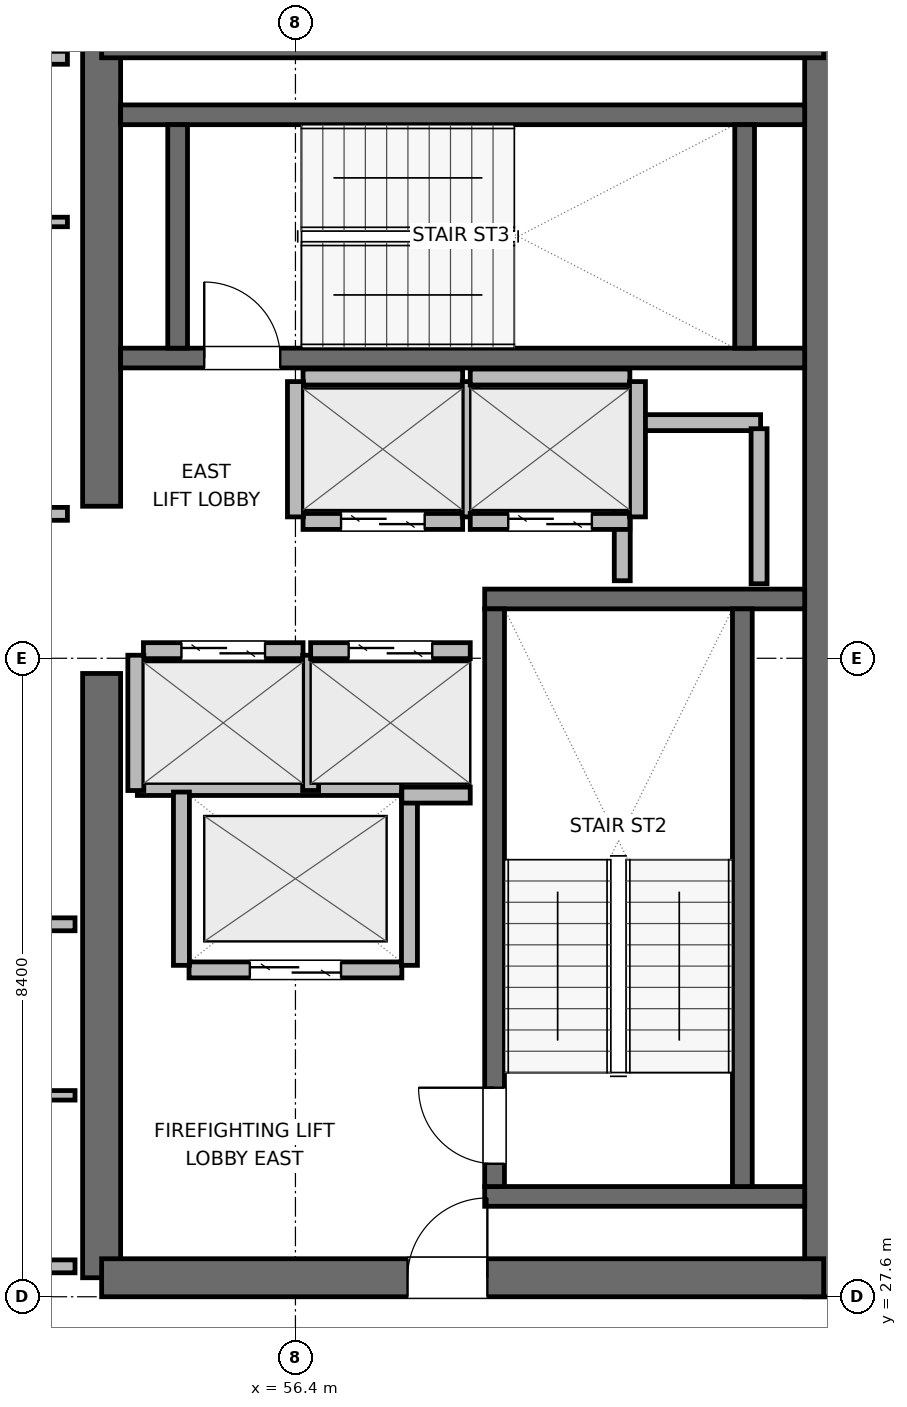
"""IFC4 building model, lengths in metres.
Left out: names, types, materials, properties, quantities, classifications, styles, units other than length and angle.
Written with IfcOpenShell. Run it as: python <this file> out.ifc"""

import sys

from ifc_helpers import new_model, si_unit, direction, frame, frame_2d, origin, place, context, subcontext, project, spatial, rectangle, extrude, element, fill, save


model = new_model("IFC4")
c1 = context("Model", 3, precision=1e-05, world=origin(), true_north=direction((0.0, 1.0)))
c2 = subcontext(c1, "Body", "Model", "MODEL_VIEW")
j1 = project(units=[si_unit("LENGTHUNIT", "METRE"), si_unit("PLANEANGLEUNIT", "RADIAN")], contexts=[c1])
p1 = place(None, origin())
s1 = spatial("IfcSite", under=j1, at=p1, CompositionType="ELEMENT")
p2 = place(p1, origin())
s2 = spatial("IfcBuilding", under=s1, at=p2, CompositionType="ELEMENT")
p3 = place(p2, frame((0.0, 0.0, 290.1)))
s3 = spatial("IfcBuildingStorey", under=s2, at=p3, CompositionType="ELEMENT", Elevation=290.1)
p4 = place(p3, frame((53.85, 27.85, 0.0), z_axis=(0.0, 0.0, 1.0), x_axis=(0.0, 1.0, 0.0)))
e1 = element("IfcWall", 1, at=p4, inside=s3, PredefinedType="SHEAR", context=c2, shape_type="SweptSolid", body=[
    extrude(rectangle(XDim=7.95, YDim=0.5, at=frame_2d((3.975, 0.0))), origin(), (0.0, 0.0, 1.0), 3.9),
])
p5 = place(p3, frame((53.85, 38.0, 0.0), z_axis=(0.0, 0.0, 1.0), x_axis=(0.0, 1.0, 0.0)))
e2 = element("IfcWall", 2, at=p5, inside=s3, PredefinedType="SHEAR", context=c2, shape_type="SweptSolid", body=[
    extrude(rectangle(XDim=6.15, YDim=0.5, at=frame_2d((3.075, 0.0))), origin(), (0.0, 0.0, 1.0), 3.9),
])
p6 = place(p3, frame((63.35, 27.6, 0.0), z_axis=(0.0, 0.0, 1.0), x_axis=(0.0, 1.0, 0.0)))
e3 = element("IfcWall", 3, at=p6, inside=s3, PredefinedType="SHEAR", context=c2, shape_type="SweptSolid", body=[
    extrude(rectangle(XDim=16.8, YDim=0.5, at=frame_2d((8.4, 0.0))), origin(), (0.0, 0.0, 1.0), 3.9),
])
p7 = place(p3, frame((53.85, 27.85, 0.0), z_axis=(0.0, 0.0, 1.0), x_axis=(1.0, 0.0, 0.0)))
e4 = element("IfcWall", 4, at=p7, inside=s3, PredefinedType="SHEAR", context=c2, shape_type="SweptSolid", body=[
    extrude(rectangle(XDim=9.5, YDim=0.5, at=frame_2d((4.75, 0.0))), origin(), (0.0, 0.0, 1.0), 3.9),
])
p8 = place(p7, frame((4.025, 0.0, 0.0)))
e5 = element("IfcOpeningElement", 5, at=p8, cuts=e4, PredefinedType="OPENING", context=c2, shape_type="SweptSolid", body=[
    extrude(rectangle(XDim=1.05, YDim=2.04, at=frame_2d((0.525, 1.02))), frame((0.0, 0.26, 0.0), z_axis=(0.0, -1.0, 0.0), x_axis=(1.0, 0.0, 0.0)), (0.0, 0.0, 1.0), 0.52),
])
p9 = place(p3, frame((53.85, 44.15, 0.0), z_axis=(0.0, 0.0, 1.0), x_axis=(1.0, 0.0, 0.0)))
e6 = element("IfcWall", 6, at=p9, inside=s3, PredefinedType="SHEAR", context=c2, shape_type="SweptSolid", body=[
    extrude(rectangle(XDim=9.5, YDim=0.5, at=frame_2d((4.75, 0.0))), origin(), (0.0, 0.0, 1.0), 3.9),
])
for number, where, z_axis, x_axis in (
    (7, (58.89, 28.92, 0.0), (0.0, 0.0, 1.0), (1.0, 0.0, 0.0)),
    (8, (58.89, 36.78, 0.0), (0.0, 0.0, 1.0), (1.0, 0.0, 0.0)),
):
    element("IfcWall", number, at=place(p3, frame(where, z_axis=z_axis, x_axis=x_axis)), inside=s3, PredefinedType="SHEAR", context=c2, shape_type="SweptSolid", body=[
        extrude(rectangle(XDim=4.21, YDim=0.26, at=frame_2d((2.105, 0.0))), origin(), (0.0, 0.0, 1.0), 3.9),
    ])
p10 = place(p3, frame((59.02, 29.05, 0.0), z_axis=(0.0, 0.0, 1.0), x_axis=(0.0, 1.0, 0.0)))
e9 = element("IfcWall", 9, at=p10, inside=s3, PredefinedType="SHEAR", context=c2, shape_type="SweptSolid", body=[
    extrude(rectangle(XDim=7.6, YDim=0.26, at=frame_2d((3.8, 0.0))), origin(), (0.0, 0.0, 1.0), 3.9),
])
p11 = place(p10, frame((0.3, 0.0, 0.0)))
e10 = element("IfcOpeningElement", 10, at=p11, cuts=e9, PredefinedType="OPENING", context=c2, shape_type="SweptSolid", body=[
    extrude(rectangle(XDim=1.0, YDim=2.04, at=frame_2d((0.5, 1.02))), frame((0.0, 0.14, 0.0), z_axis=(0.0, -1.0, 0.0), x_axis=(1.0, 0.0, 0.0)), (0.0, 0.0, 1.0), 0.28),
])
p12 = place(p3, frame((62.28, 29.05, 0.0), z_axis=(0.0, 0.0, 1.0), x_axis=(0.0, 1.0, 0.0)))
e11 = element("IfcWall", 11, at=p12, inside=s3, PredefinedType="SHEAR", context=c2, shape_type="SweptSolid", body=[
    extrude(rectangle(XDim=7.6, YDim=0.26, at=frame_2d((3.8, 0.0))), origin(), (0.0, 0.0, 1.0), 3.9),
])
p13 = place(p3, frame((54.1, 39.95, 0.0), z_axis=(0.0, 0.0, 1.0), x_axis=(1.0, 0.0, 0.0)))
e12 = element("IfcWall", 12, at=p13, inside=s3, PredefinedType="SHEAR", context=c2, shape_type="SweptSolid", body=[
    extrude(rectangle(XDim=9.0, YDim=0.26, at=frame_2d((4.5, 0.0))), origin(), (0.0, 0.0, 1.0), 3.9),
])
p14 = place(p13, frame((1.1, 0.0, 0.0)))
e13 = element("IfcOpeningElement", 13, at=p14, cuts=e12, PredefinedType="OPENING", context=c2, shape_type="SweptSolid", body=[
    extrude(rectangle(XDim=1.0, YDim=2.04, at=frame_2d((0.5, 1.02))), frame((0.0, 0.14, 0.0), z_axis=(0.0, -1.0, 0.0), x_axis=(1.0, 0.0, 0.0)), (0.0, 0.0, 1.0), 0.28),
])
p15 = place(p3, frame((54.1, 43.15, 0.0), z_axis=(0.0, 0.0, 1.0), x_axis=(1.0, 0.0, 0.0)))
e14 = element("IfcWall", 14, at=p15, inside=s3, PredefinedType="SHEAR", context=c2, shape_type="SweptSolid", body=[
    extrude(rectangle(XDim=9.0, YDim=0.26, at=frame_2d((4.5, 0.0))), origin(), (0.0, 0.0, 1.0), 3.9),
])
for number, where, z_axis, x_axis in (
    (15, (54.85, 40.08, 0.0), (0.0, 0.0, 1.0), (0.0, 1.0, 0.0)),
    (16, (62.31, 40.08, 0.0), (0.0, 0.0, 1.0), (0.0, 1.0, 0.0)),
):
    element("IfcWall", number, at=place(p3, frame(where, z_axis=z_axis, x_axis=x_axis)), inside=s3, PredefinedType="SHEAR", context=c2, shape_type="SweptSolid", body=[
        extrude(rectangle(XDim=2.94, YDim=0.26, at=frame_2d((1.47, 0.0))), origin(), (0.0, 0.0, 1.0), 3.9),
    ])
p16 = place(p3, frame((60.72, 39.1, 0.0), z_axis=(0.0, 0.0, 1.0), x_axis=(1.0, 0.0, 0.0)))
e17 = element("IfcWall", 17, at=p16, inside=s3, PredefinedType="PARTITIONING", context=c2, shape_type="SweptSolid", body=[
    extrude(rectangle(XDim=1.8, YDim=0.21, at=frame_2d((0.9, 0.0))), origin(), (0.0, 0.0, 1.0), 3.68),
])
p17 = place(p3, frame((60.7, 37.02, 0.0), z_axis=(0.0, 0.0, 1.0), x_axis=(0.0, 1.0, 0.0)))
e18 = element("IfcWall", 18, at=p17, inside=s3, PredefinedType="PARTITIONING", context=c2, shape_type="SweptSolid", body=[
    extrude(rectangle(XDim=1.96, YDim=0.21, at=frame_2d((0.98, 0.0))), origin(), (0.0, 0.0, 1.0), 3.68),
])
p18 = place(p3, frame((62.5, 36.98, 0.0), z_axis=(0.0, 0.0, 1.0), x_axis=(0.0, 1.0, 0.0)))
e19 = element("IfcWall", 19, at=p18, inside=s3, PredefinedType="PARTITIONING", context=c2, shape_type="SweptSolid", body=[
    extrude(rectangle(XDim=2.04, YDim=0.21, at=frame_2d((1.02, 0.0))), origin(), (0.0, 0.0, 1.0), 3.68),
])
p19 = place(p3, frame((55.0, 31.9, 0.0), z_axis=(0.0, 0.0, 1.0), x_axis=(1.0, 0.0, 0.0)))
e20 = element("IfcWall", 20, at=p19, inside=s3, PredefinedType="PARTITIONING", context=c2, shape_type="SweptSolid", body=[
    extrude(rectangle(XDim=2.8, YDim=0.21, at=frame_2d((1.4, 0.0))), origin(), (0.0, 0.0, 1.0), 3.68),
])
p20 = place(p19, frame((0.8, 0.0, 0.0)))
e21 = element("IfcOpeningElement", 21, at=p20, cuts=e20, PredefinedType="OPENING", context=c2, shape_type="SweptSolid", body=[
    extrude(rectangle(XDim=1.2, YDim=2.04, at=frame_2d((0.6, 1.02))), frame((0.0, 0.115, 0.0), z_axis=(0.0, -1.0, 0.0), x_axis=(1.0, 0.0, 0.0)), (0.0, 0.0, 1.0), 0.23),
])
p21 = place(p3, frame((54.32, 34.3, 0.0), z_axis=(0.0, 0.0, 1.0), x_axis=(1.0, 0.0, 0.0)))
e22 = element("IfcWall", 22, at=p21, inside=s3, PredefinedType="PARTITIONING", context=c2, shape_type="SweptSolid", body=[
    extrude(rectangle(XDim=3.48, YDim=0.21, at=frame_2d((1.74, 0.0))), origin(), (0.0, 0.0, 1.0), 3.68),
])
for number, where, z_axis, x_axis in (
    (23, (54.9, 31.96, 0.0), (0.0, 0.0, 1.0), (0.0, 1.0, 0.0)),
    (24, (57.9, 31.96, 0.0), (0.0, 0.0, 1.0), (0.0, 1.0, 0.0)),
):
    element("IfcWall", number, at=place(p3, frame(where, z_axis=z_axis, x_axis=x_axis)), inside=s3, PredefinedType="PARTITIONING", context=c2, shape_type="SweptSolid", body=[
        extrude(rectangle(XDim=2.28, YDim=0.21, at=frame_2d((1.14, 0.0))), origin(), (0.0, 0.0, 1.0), 3.68),
    ])
p22 = place(p3, frame((54.4, 36.1, 0.0), z_axis=(0.0, 0.0, 1.0), x_axis=(1.0, 0.0, 0.0)))
e25 = element("IfcWall", 25, at=p22, inside=s3, PredefinedType="PARTITIONING", context=c2, shape_type="SweptSolid", body=[
    extrude(rectangle(XDim=2.1, YDim=0.21, at=frame_2d((1.05, 0.0))), origin(), (0.0, 0.0, 1.0), 3.68),
])
p23 = place(p22, frame((0.5, 0.0, 0.0)))
e26 = element("IfcOpeningElement", 26, at=p23, cuts=e25, PredefinedType="OPENING", context=c2, shape_type="SweptSolid", body=[
    extrude(rectangle(XDim=1.1, YDim=2.04, at=frame_2d((0.55, 1.02))), frame((0.0, 0.115, 0.0), z_axis=(0.0, -1.0, 0.0), x_axis=(1.0, 0.0, 0.0)), (0.0, 0.0, 1.0), 0.23),
])
for number, where, z_axis, x_axis in (
    (27, (54.3, 34.26, 0.0), (0.0, 0.0, 1.0), (0.0, 1.0, 0.0)),
    (28, (56.6, 34.26, 0.0), (0.0, 0.0, 1.0), (0.0, 1.0, 0.0)),
):
    element("IfcWall", number, at=place(p3, frame(where, z_axis=z_axis, x_axis=x_axis)), inside=s3, PredefinedType="PARTITIONING", context=c2, shape_type="SweptSolid", body=[
        extrude(rectangle(XDim=1.78, YDim=0.21, at=frame_2d((0.89, 0.0))), origin(), (0.0, 0.0, 1.0), 3.68),
    ])
p24 = place(p3, frame((56.6, 36.1, 0.0), z_axis=(0.0, 0.0, 1.0), x_axis=(1.0, 0.0, 0.0)))
e29 = element("IfcWall", 29, at=p24, inside=s3, PredefinedType="PARTITIONING", context=c2, shape_type="SweptSolid", body=[
    extrude(rectangle(XDim=2.1, YDim=0.21, at=frame_2d((1.05, 0.0))), origin(), (0.0, 0.0, 1.0), 3.68),
])
p25 = place(p24, frame((0.5, 0.0, 0.0)))
e30 = element("IfcOpeningElement", 30, at=p25, cuts=e29, PredefinedType="OPENING", context=c2, shape_type="SweptSolid", body=[
    extrude(rectangle(XDim=1.1, YDim=2.04, at=frame_2d((0.55, 1.02))), frame((0.0, 0.115, 0.0), z_axis=(0.0, -1.0, 0.0), x_axis=(1.0, 0.0, 0.0)), (0.0, 0.0, 1.0), 0.23),
])
p26 = place(p3, frame((57.8, 34.2, 0.0), z_axis=(0.0, 0.0, 1.0), x_axis=(1.0, 0.0, 0.0)))
e31 = element("IfcWall", 31, at=p26, inside=s3, PredefinedType="PARTITIONING", context=c2, shape_type="SweptSolid", body=[
    extrude(rectangle(XDim=0.9, YDim=0.21, at=frame_2d((0.45, 0.0))), origin(), (0.0, 0.0, 1.0), 3.68),
])
p27 = place(p3, frame((56.5, 37.8, 0.0), z_axis=(0.0, 0.0, 1.0), x_axis=(1.0, 0.0, 0.0)))
e32 = element("IfcWall", 32, at=p27, inside=s3, PredefinedType="PARTITIONING", context=c2, shape_type="SweptSolid", body=[
    extrude(rectangle(XDim=2.1, YDim=0.21, at=frame_2d((1.05, 0.0))), origin(), (0.0, 0.0, 1.0), 3.68),
])
p28 = place(p27, frame((0.5, 0.0, 0.0)))
e33 = element("IfcOpeningElement", 33, at=p28, cuts=e32, PredefinedType="OPENING", context=c2, shape_type="SweptSolid", body=[
    extrude(rectangle(XDim=1.1, YDim=2.04, at=frame_2d((0.55, 1.02))), frame((0.0, 0.115, 0.0), z_axis=(0.0, -1.0, 0.0), x_axis=(1.0, 0.0, 0.0)), (0.0, 0.0, 1.0), 0.23),
])
p29 = place(p3, frame((56.5, 39.7, 0.0), z_axis=(0.0, 0.0, 1.0), x_axis=(1.0, 0.0, 0.0)))
e34 = element("IfcWall", 34, at=p29, inside=s3, PredefinedType="PARTITIONING", context=c2, shape_type="SweptSolid", body=[
    extrude(rectangle(XDim=2.1, YDim=0.21, at=frame_2d((1.05, 0.0))), origin(), (0.0, 0.0, 1.0), 3.68),
])
for number, where, z_axis, x_axis in (
    (35, (56.4, 37.86, 0.0), (0.0, 0.0, 1.0), (0.0, 1.0, 0.0)),
    (36, (58.7, 37.86, 0.0), (0.0, 0.0, 1.0), (0.0, 1.0, 0.0)),
):
    element("IfcWall", number, at=place(p3, frame(where, z_axis=z_axis, x_axis=x_axis)), inside=s3, PredefinedType="PARTITIONING", context=c2, shape_type="SweptSolid", body=[
        extrude(rectangle(XDim=1.78, YDim=0.21, at=frame_2d((0.89, 0.0))), origin(), (0.0, 0.0, 1.0), 3.68),
    ])
p30 = place(p3, frame((58.7, 37.8, 0.0), z_axis=(0.0, 0.0, 1.0), x_axis=(1.0, 0.0, 0.0)))
e37 = element("IfcWall", 37, at=p30, inside=s3, PredefinedType="PARTITIONING", context=c2, shape_type="SweptSolid", body=[
    extrude(rectangle(XDim=2.1, YDim=0.21, at=frame_2d((1.05, 0.0))), origin(), (0.0, 0.0, 1.0), 3.68),
])
p31 = place(p30, frame((0.5, 0.0, 0.0)))
e38 = element("IfcOpeningElement", 38, at=p31, cuts=e37, PredefinedType="OPENING", context=c2, shape_type="SweptSolid", body=[
    extrude(rectangle(XDim=1.1, YDim=2.04, at=frame_2d((0.55, 1.02))), frame((0.0, 0.115, 0.0), z_axis=(0.0, -1.0, 0.0), x_axis=(1.0, 0.0, 0.0)), (0.0, 0.0, 1.0), 0.23),
])
p32 = place(p3, frame((58.7, 39.7, 0.0), z_axis=(0.0, 0.0, 1.0), x_axis=(1.0, 0.0, 0.0)))
e39 = element("IfcWall", 39, at=p32, inside=s3, PredefinedType="PARTITIONING", context=c2, shape_type="SweptSolid", body=[
    extrude(rectangle(XDim=2.1, YDim=0.21, at=frame_2d((1.05, 0.0))), origin(), (0.0, 0.0, 1.0), 3.68),
])
p33 = place(p3, frame((60.9, 37.86, 0.0), z_axis=(0.0, 0.0, 1.0), x_axis=(0.0, 1.0, 0.0)))
e40 = element("IfcWall", 40, at=p33, inside=s3, PredefinedType="PARTITIONING", context=c2, shape_type="SweptSolid", body=[
    extrude(rectangle(XDim=1.78, YDim=0.21, at=frame_2d((0.89, 0.0))), origin(), (0.0, 0.0, 1.0), 3.68),
])
p34 = place(p3, frame((49.287, 28.0, 0.0), z_axis=(0.0, 0.0, 1.0), x_axis=(1.0, 0.0, 0.0)))
e41 = element("IfcWall", 41, at=p34, inside=s3, PredefinedType="PARTITIONING", context=c2, shape_type="SweptSolid", body=[
    extrude(rectangle(XDim=4.213, YDim=0.17, at=frame_2d((2.106, 0.0))), origin(), (0.0, 0.0, 1.0), 2.765),
])
p35 = place(p3, frame((52.2, 32.5, 0.0), z_axis=(0.0, 0.0, 1.0), x_axis=(1.0, 0.0, 0.0)))
e42 = element("IfcWall", 42, at=p35, inside=s3, PredefinedType="PARTITIONING", context=c2, shape_type="SweptSolid", body=[
    extrude(rectangle(XDim=1.3, YDim=0.17, at=frame_2d((0.65, 0.0))), origin(), (0.0, 0.0, 1.0), 3.68),
])
p36 = place(p3, frame((49.287, 30.25, 0.0), z_axis=(0.0, 0.0, 1.0), x_axis=(1.0, 0.0, 0.0)))
e43 = element("IfcWall", 43, at=p36, inside=s3, PredefinedType="PARTITIONING", context=c2, shape_type="SweptSolid", body=[
    extrude(rectangle(XDim=4.213, YDim=0.125, at=frame_2d((2.106, 0.0))), origin(), (0.0, 0.0, 1.0), 3.68),
])
p37 = place(p3, frame((49.287, 37.9, 0.0), z_axis=(0.0, 0.0, 1.0), x_axis=(1.0, 0.0, 0.0)))
e44 = element("IfcWall", 44, at=p37, inside=s3, PredefinedType="PARTITIONING", context=c2, shape_type="SweptSolid", body=[
    extrude(rectangle(XDim=4.113, YDim=0.17, at=frame_2d((2.056, 0.0))), origin(), (0.0, 0.0, 1.0), 3.68),
])
p38 = place(p3, frame((49.287, 43.9, 0.0), z_axis=(0.0, 0.0, 1.0), x_axis=(1.0, 0.0, 0.0)))
e45 = element("IfcWall", 45, at=p38, inside=s3, PredefinedType="PARTITIONING", context=c2, shape_type="SweptSolid", body=[
    extrude(rectangle(XDim=4.113, YDim=0.17, at=frame_2d((2.056, 0.0))), origin(), (0.0, 0.0, 1.0), 2.765),
])
p39 = place(p3, frame((49.287, 41.74, 0.0), z_axis=(0.0, 0.0, 1.0), x_axis=(1.0, 0.0, 0.0)))
e46 = element("IfcWall", 46, at=p39, inside=s3, PredefinedType="PARTITIONING", context=c2, shape_type="SweptSolid", body=[
    extrude(rectangle(XDim=4.113, YDim=0.125, at=frame_2d((2.056, 0.0))), origin(), (0.0, 0.0, 1.0), 3.68),
])
p40 = place(p11, origin())
e47 = element("IfcDoor", 47, at=p40, inside=s3, OperationType="SINGLE_SWING_RIGHT", PredefinedType="DOOR", context=c2, shape_type="SweptSolid", body=[
    extrude(rectangle(XDim=1.0, YDim=2.04, at=frame_2d((0.5, 1.02))), frame((0.0, 0.025, 0.0), z_axis=(0.0, -1.0, 0.0), x_axis=(1.0, 0.0, 0.0)), (0.0, 0.0, 1.0), 0.05),
])
fill(e10, e47)
p41 = place(p14, origin())
e48 = element("IfcDoor", 48, at=p41, inside=s3, OperationType="SINGLE_SWING_LEFT", PredefinedType="DOOR", context=c2, shape_type="SweptSolid", body=[
    extrude(rectangle(XDim=1.0, YDim=2.04, at=frame_2d((0.5, 1.02))), frame((0.0, 0.025, 0.0), z_axis=(0.0, -1.0, 0.0), x_axis=(1.0, 0.0, 0.0)), (0.0, 0.0, 1.0), 0.05),
])
fill(e13, e48)
p42 = place(p20, origin())
e49 = element("IfcDoor", 49, at=p42, inside=s3, OperationType="DOUBLE_DOOR_SLIDING", PredefinedType="DOOR", context=c2, shape_type="SweptSolid", body=[
    extrude(rectangle(XDim=1.2, YDim=2.04, at=frame_2d((0.6, 1.02))), frame((0.0, 0.025, 0.0), z_axis=(0.0, -1.0, 0.0), x_axis=(1.0, 0.0, 0.0)), (0.0, 0.0, 1.0), 0.05),
])
fill(e21, e49)
p43 = place(p23, origin())
e50 = element("IfcDoor", 50, at=p43, inside=s3, OperationType="DOUBLE_DOOR_SLIDING", PredefinedType="DOOR", context=c2, shape_type="SweptSolid", body=[
    extrude(rectangle(XDim=1.1, YDim=2.04, at=frame_2d((0.55, 1.02))), frame((0.0, 0.025, 0.0), z_axis=(0.0, -1.0, 0.0), x_axis=(1.0, 0.0, 0.0)), (0.0, 0.0, 1.0), 0.05),
])
fill(e26, e50)
p44 = place(p25, origin())
e51 = element("IfcDoor", 51, at=p44, inside=s3, OperationType="DOUBLE_DOOR_SLIDING", PredefinedType="DOOR", context=c2, shape_type="SweptSolid", body=[
    extrude(rectangle(XDim=1.1, YDim=2.04, at=frame_2d((0.55, 1.02))), frame((0.0, 0.025, 0.0), z_axis=(0.0, -1.0, 0.0), x_axis=(1.0, 0.0, 0.0)), (0.0, 0.0, 1.0), 0.05),
])
fill(e30, e51)
p45 = place(p28, origin())
e52 = element("IfcDoor", 52, at=p45, inside=s3, OperationType="DOUBLE_DOOR_SLIDING", PredefinedType="DOOR", context=c2, shape_type="SweptSolid", body=[
    extrude(rectangle(XDim=1.1, YDim=2.04, at=frame_2d((0.55, 1.02))), frame((0.0, 0.025, 0.0), z_axis=(0.0, -1.0, 0.0), x_axis=(1.0, 0.0, 0.0)), (0.0, 0.0, 1.0), 0.05),
])
fill(e33, e52)
p46 = place(p31, origin())
e53 = element("IfcDoor", 53, at=p46, inside=s3, OperationType="DOUBLE_DOOR_SLIDING", PredefinedType="DOOR", context=c2, shape_type="SweptSolid", body=[
    extrude(rectangle(XDim=1.1, YDim=2.04, at=frame_2d((0.55, 1.02))), frame((0.0, 0.025, 0.0), z_axis=(0.0, -1.0, 0.0), x_axis=(1.0, 0.0, 0.0)), (0.0, 0.0, 1.0), 0.05),
])
fill(e38, e53)
p47 = place(p8, origin())
e54 = element("IfcDoor", 54, at=p47, inside=s3, OperationType="SINGLE_SWING_RIGHT", PredefinedType="DOOR", context=c2, shape_type="SweptSolid", body=[
    extrude(rectangle(XDim=1.05, YDim=2.04, at=frame_2d((0.525, 1.02))), frame((0.0, 0.025, 0.0), z_axis=(0.0, -1.0, 0.0), x_axis=(1.0, 0.0, 0.0)), (0.0, 0.0, 1.0), 0.05),
])
fill(e5, e54)
save(model, sys.argv[1])
